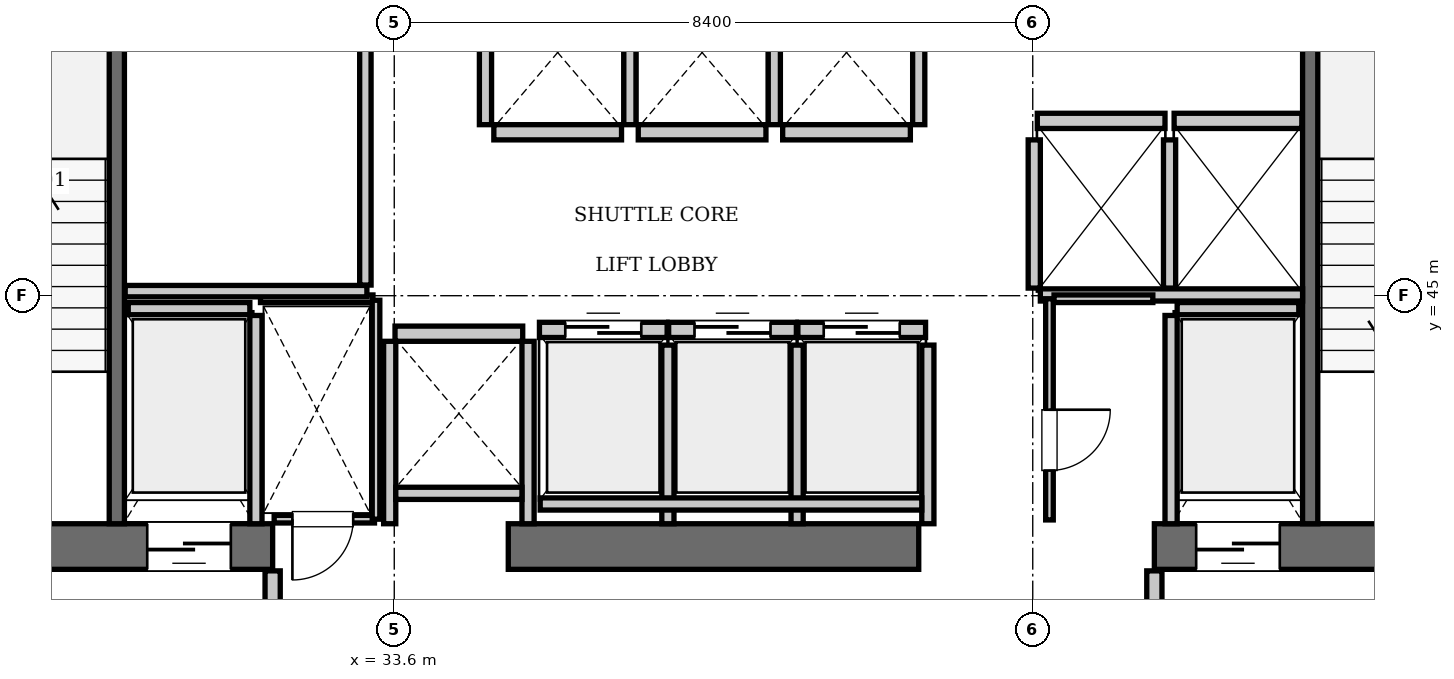
"""IFC4 building model, lengths in metres.
Left out: names, types, materials, properties, quantities, classifications, styles, units other than length and angle.
Written with IfcOpenShell. Run it as: python <this file> out.ifc"""

import sys

from ifc_helpers import new_model, si_unit, direction, frame, frame_2d, origin, place, context, subcontext, project, spatial, rectangle, extrude, element, fill, save


model = new_model("IFC4")
c1 = context("Model", 3, precision=1e-05, world=origin(), true_north=direction((0.0, 1.0)))
c2 = subcontext(c1, "Body", "Model", "MODEL_VIEW")
j1 = project(units=[si_unit("LENGTHUNIT", "METRE"), si_unit("PLANEANGLEUNIT", "RADIAN")], contexts=[c1])
p1 = place(None, origin())
s1 = spatial("IfcSite", under=j1, at=p1, CompositionType="ELEMENT")
p2 = place(p1, origin())
s2 = spatial("IfcBuilding", under=s1, at=p2, CompositionType="ELEMENT")
p3 = place(p2, frame((0.0, 0.0, 239.4)))
s3 = spatial("IfcBuildingStorey", under=s2, at=p3, CompositionType="ELEMENT", Elevation=239.4)
p4 = place(p3, frame((25.2, 41.7, 0.0), z_axis=(0.0, 0.0, 1.0), x_axis=(1.0, 0.0, 0.0)))
e1 = element("IfcWall", 1, at=p4, inside=s3, PredefinedType="SHEAR", context=c2, shape_type="SweptSolid", body=[
    extrude(rectangle(XDim=6.8, YDim=0.6, at=frame_2d((3.4, 0.0))), origin(), (0.0, 0.0, 1.0), 3.85),
])
p5 = place(p4, frame((1.65, 0.0, 0.0)))
e2 = element("IfcOpeningElement", 2, at=p5, cuts=e1, PredefinedType="OPENING", context=c2, shape_type="SweptSolid", body=[
    extrude(rectangle(XDim=1.15, YDim=2.15, at=frame_2d((0.575, 1.075))), frame((0.0, 0.31, 0.0), z_axis=(0.0, -1.0, 0.0), x_axis=(1.0, 0.0, 0.0)), (0.0, 0.0, 1.0), 0.62),
])
p6 = place(p4, frame((5.15, 0.0, 0.0)))
e3 = element("IfcOpeningElement", 3, at=p6, cuts=e1, PredefinedType="OPENING", context=c2, shape_type="SweptSolid", body=[
    extrude(rectangle(XDim=1.1, YDim=2.2, at=frame_2d((0.55, 1.1))), frame((0.0, 0.31, 0.0), z_axis=(0.0, -1.0, 0.0), x_axis=(1.0, 0.0, 0.0)), (0.0, 0.0, 1.0), 0.62),
])
p7 = place(p3, frame((35.1, 41.7, 0.0), z_axis=(0.0, 0.0, 1.0), x_axis=(1.0, 0.0, 0.0)))
e4 = element("IfcWall", 4, at=p7, inside=s3, PredefinedType="SHEAR", context=c2, shape_type="SweptSolid", body=[
    extrude(rectangle(XDim=5.4, YDim=0.6, at=frame_2d((2.7, 0.0))), origin(), (0.0, 0.0, 1.0), 3.85),
])
p8 = place(p3, frame((43.6, 41.7, 0.0), z_axis=(0.0, 0.0, 1.0), x_axis=(1.0, 0.0, 0.0)))
e5 = element("IfcWall", 5, at=p8, inside=s3, PredefinedType="SHEAR", context=c2, shape_type="SweptSolid", body=[
    extrude(rectangle(XDim=6.8, YDim=0.6, at=frame_2d((3.4, 0.0))), origin(), (0.0, 0.0, 1.0), 3.85),
])
p9 = place(p8, frame((3.9, 0.0, 0.0)))
e6 = element("IfcOpeningElement", 6, at=p9, cuts=e5, PredefinedType="OPENING", context=c2, shape_type="SweptSolid", body=[
    extrude(rectangle(XDim=1.15, YDim=2.15, at=frame_2d((0.575, 1.075))), frame((0.0, 0.31, 0.0), z_axis=(0.0, -1.0, 0.0), x_axis=(1.0, 0.0, 0.0)), (0.0, 0.0, 1.0), 0.62),
])
p10 = place(p8, frame((0.55, 0.0, 0.0)))
e7 = element("IfcOpeningElement", 7, at=p10, cuts=e5, PredefinedType="OPENING", context=c2, shape_type="SweptSolid", body=[
    extrude(rectangle(XDim=1.1, YDim=2.2, at=frame_2d((0.55, 1.1))), frame((0.0, 0.31, 0.0), z_axis=(0.0, -1.0, 0.0), x_axis=(1.0, 0.0, 0.0)), (0.0, 0.0, 1.0), 0.62),
])
for number, where, z_axis, x_axis in (
    (8, (29.95, 42.0, 0.0), (0.0, 0.0, 1.0), (0.0, 1.0, 0.0)),
    (9, (45.65, 42.0, 0.0), (0.0, 0.0, 1.0), (0.0, 1.0, 0.0)),
):
    element("IfcWall", number, at=place(p3, frame(where, z_axis=z_axis, x_axis=x_axis)), inside=s3, PredefinedType="SOLIDWALL", context=c2, shape_type="SweptSolid", body=[
        extrude(rectangle(XDim=9.15, YDim=0.2, at=frame_2d((4.575, 0.0))), origin(), (0.0, 0.0, 1.0), 3.61),
    ])
for number, where, z_axis, x_axis in (
    (10, (42.06, 47.3, 0.0), (0.0, 0.0, 1.0), (1.0, 0.0, 0.0)),
    (11, (43.86, 47.3, 0.0), (0.0, 0.0, 1.0), (1.0, 0.0, 0.0)),
):
    element("IfcWall", number, at=place(p3, frame(where, z_axis=z_axis, x_axis=x_axis)), inside=s3, PredefinedType="SOLIDWALL", context=c2, shape_type="SweptSolid", body=[
        extrude(rectangle(XDim=1.68, YDim=0.2, at=frame_2d((0.84, 0.0))), origin(), (0.0, 0.0, 1.0), 3.61),
    ])
p11 = place(p3, frame((35.51, 44.55, 0.0), z_axis=(0.0, 0.0, 1.0), x_axis=(1.0, 0.0, 0.0)))
e12 = element("IfcWall", 12, at=p11, inside=s3, PredefinedType="SOLIDWALL", context=c2, shape_type="SweptSolid", body=[
    extrude(rectangle(XDim=1.68, YDim=0.2, at=frame_2d((0.84, 0.0))), origin(), (0.0, 0.0, 1.0), 3.61),
])
p12 = place(p11, frame((0.34, 0.0, 0.0)))
e13 = element("IfcOpeningElement", 13, at=p12, cuts=e12, PredefinedType="OPENING", context=c2, shape_type="SweptSolid", body=[
    extrude(rectangle(XDim=1.0, YDim=2.15, at=frame_2d((0.5, 1.075))), frame((0.0, 0.11, 0.0), z_axis=(0.0, -1.0, 0.0), x_axis=(1.0, 0.0, 0.0)), (0.0, 0.0, 1.0), 0.22),
])
p13 = place(p3, frame((37.21, 44.55, 0.0), z_axis=(0.0, 0.0, 1.0), x_axis=(1.0, 0.0, 0.0)))
e14 = element("IfcWall", 14, at=p13, inside=s3, PredefinedType="SOLIDWALL", context=c2, shape_type="SweptSolid", body=[
    extrude(rectangle(XDim=1.68, YDim=0.2, at=frame_2d((0.84, 0.0))), origin(), (0.0, 0.0, 1.0), 3.61),
])
p14 = place(p13, frame((0.34, 0.0, 0.0)))
e15 = element("IfcOpeningElement", 15, at=p14, cuts=e14, PredefinedType="OPENING", context=c2, shape_type="SweptSolid", body=[
    extrude(rectangle(XDim=1.0, YDim=2.15, at=frame_2d((0.5, 1.075))), frame((0.0, 0.11, 0.0), z_axis=(0.0, -1.0, 0.0), x_axis=(1.0, 0.0, 0.0)), (0.0, 0.0, 1.0), 0.22),
])
p15 = place(p3, frame((38.91, 44.55, 0.0), z_axis=(0.0, 0.0, 1.0), x_axis=(1.0, 0.0, 0.0)))
e16 = element("IfcWall", 16, at=p15, inside=s3, PredefinedType="SOLIDWALL", context=c2, shape_type="SweptSolid", body=[
    extrude(rectangle(XDim=1.68, YDim=0.2, at=frame_2d((0.84, 0.0))), origin(), (0.0, 0.0, 1.0), 3.61),
])
p16 = place(p15, frame((0.34, 0.0, 0.0)))
e17 = element("IfcOpeningElement", 17, at=p16, cuts=e16, PredefinedType="OPENING", context=c2, shape_type="SweptSolid", body=[
    extrude(rectangle(XDim=1.0, YDim=2.15, at=frame_2d((0.5, 1.075))), frame((0.0, 0.11, 0.0), z_axis=(0.0, -1.0, 0.0), x_axis=(1.0, 0.0, 0.0)), (0.0, 0.0, 1.0), 0.22),
])
p17 = place(p3, frame((34.91, 47.15, 0.0), z_axis=(0.0, 0.0, 1.0), x_axis=(1.0, 0.0, 0.0)))
e18 = element("IfcWall", 18, at=p17, inside=s3, PredefinedType="SOLIDWALL", context=c2, shape_type="SweptSolid", body=[
    extrude(rectangle(XDim=1.68, YDim=0.2, at=frame_2d((0.84, 0.0))), origin(), (0.0, 0.0, 1.0), 3.61),
])
for number, where, z_axis, x_axis in (
    (19, (36.81, 47.15, 0.0), (0.0, 0.0, 1.0), (1.0, 0.0, 0.0)),
    (20, (38.71, 47.15, 0.0), (0.0, 0.0, 1.0), (1.0, 0.0, 0.0)),
    (21, (33.61, 44.5, 0.0), (0.0, 0.0, 1.0), (1.0, 0.0, 0.0)),
):
    element("IfcWall", number, at=place(p3, frame(where, z_axis=z_axis, x_axis=x_axis)), inside=s3, PredefinedType="SOLIDWALL", context=c2, shape_type="SweptSolid", body=[
        extrude(rectangle(XDim=1.68, YDim=0.2, at=frame_2d((0.84, 0.0))), origin(), (0.0, 0.0, 1.0), 3.61),
    ])
p18 = place(p3, frame((30.1, 44.83, 0.0), z_axis=(0.0, 0.0, 1.0), x_axis=(1.0, 0.0, 0.0)))
e22 = element("IfcWall", 22, at=p18, inside=s3, PredefinedType="SOLIDWALL", context=c2, shape_type="SweptSolid", body=[
    extrude(rectangle(XDim=1.6, YDim=0.16, at=frame_2d((0.8, 0.0))), origin(), (0.0, 0.0, 1.0), 3.61),
])
p19 = place(p3, frame((31.78, 42.0, 0.0), z_axis=(0.0, 0.0, 1.0), x_axis=(0.0, 1.0, 0.0)))
e23 = element("IfcWall", 23, at=p19, inside=s3, PredefinedType="SOLIDWALL", context=c2, shape_type="SweptSolid", body=[
    extrude(rectangle(XDim=2.74, YDim=0.16, at=frame_2d((1.37, 0.0))), origin(), (0.0, 0.0, 1.0), 3.61),
])
p20 = place(p3, frame((43.9, 44.83, 0.0), z_axis=(0.0, 0.0, 1.0), x_axis=(1.0, 0.0, 0.0)))
e24 = element("IfcWall", 24, at=p20, inside=s3, PredefinedType="SOLIDWALL", context=c2, shape_type="SweptSolid", body=[
    extrude(rectangle(XDim=1.6, YDim=0.16, at=frame_2d((0.8, 0.0))), origin(), (0.0, 0.0, 1.0), 3.61),
])
p21 = place(p3, frame((43.82, 42.0, 0.0), z_axis=(0.0, 0.0, 1.0), x_axis=(0.0, 1.0, 0.0)))
e25 = element("IfcWall", 25, at=p21, inside=s3, PredefinedType="SOLIDWALL", context=c2, shape_type="SweptSolid", body=[
    extrude(rectangle(XDim=2.74, YDim=0.16, at=frame_2d((1.37, 0.0))), origin(), (0.0, 0.0, 1.0), 3.61),
])
for number, where, z_axis, x_axis in (
    (26, (42.02, 45.1, 0.0), (0.0, 0.0, 1.0), (0.0, 1.0, 0.0)),
    (27, (43.8, 45.1, 0.0), (0.0, 0.0, 1.0), (0.0, 1.0, 0.0)),
):
    element("IfcWall", number, at=place(p3, frame(where, z_axis=z_axis, x_axis=x_axis)), inside=s3, PredefinedType="SOLIDWALL", context=c2, shape_type="SweptSolid", body=[
        extrude(rectangle(XDim=1.95, YDim=0.16, at=frame_2d((0.975, 0.0))), origin(), (0.0, 0.0, 1.0), 3.61),
    ])
p22 = place(p3, frame((42.1, 45.01, 0.0), z_axis=(0.0, 0.0, 1.0), x_axis=(1.0, 0.0, 0.0)))
e28 = element("IfcWall", 28, at=p22, inside=s3, PredefinedType="SOLIDWALL", context=c2, shape_type="SweptSolid", body=[
    extrude(rectangle(XDim=3.45, YDim=0.16, at=frame_2d((1.725, 0.0))), origin(), (0.0, 0.0, 1.0), 3.61),
])
for number, where, z_axis, x_axis in (
    (29, (37.2, 42.0, 0.0), (0.0, 0.0, 1.0), (0.0, 1.0, 0.0)),
    (30, (38.9, 42.0, 0.0), (0.0, 0.0, 1.0), (0.0, 1.0, 0.0)),
    (31, (40.62, 42.0, 0.0), (0.0, 0.0, 1.0), (0.0, 1.0, 0.0)),
):
    element("IfcWall", number, at=place(p3, frame(where, z_axis=z_axis, x_axis=x_axis)), inside=s3, PredefinedType="SOLIDWALL", context=c2, shape_type="SweptSolid", body=[
        extrude(rectangle(XDim=2.35, YDim=0.16, at=frame_2d((1.175, 0.0))), origin(), (0.0, 0.0, 1.0), 3.61),
    ])
p23 = place(p3, frame((35.52, 42.26, 0.0), z_axis=(0.0, 0.0, 1.0), x_axis=(1.0, 0.0, 0.0)))
e32 = element("IfcWall", 32, at=p23, inside=s3, PredefinedType="SOLIDWALL", context=c2, shape_type="SweptSolid", body=[
    extrude(rectangle(XDim=5.02, YDim=0.16, at=frame_2d((2.51, 0.0))), origin(), (0.0, 0.0, 1.0), 3.61),
])
for number, where, z_axis, x_axis in (
    (33, (34.8, 47.25, 0.0), (0.0, 0.0, 1.0), (0.0, 1.0, 0.0)),
    (34, (36.7, 47.25, 0.0), (0.0, 0.0, 1.0), (0.0, 1.0, 0.0)),
    (35, (38.6, 47.25, 0.0), (0.0, 0.0, 1.0), (0.0, 1.0, 0.0)),
    (36, (40.5, 47.25, 0.0), (0.0, 0.0, 1.0), (0.0, 1.0, 0.0)),
):
    element("IfcWall", number, at=place(p3, frame(where, z_axis=z_axis, x_axis=x_axis)), inside=s3, PredefinedType="SOLIDWALL", context=c2, shape_type="SweptSolid", body=[
        extrude(rectangle(XDim=2.19, YDim=0.16, at=frame_2d((1.095, 0.0))), origin(), (0.0, 0.0, 1.0), 3.61),
    ])
for number, where, z_axis, x_axis in (
    (37, (33.54, 42.0, 0.0), (0.0, 0.0, 1.0), (0.0, 1.0, 0.0)),
    (38, (35.36, 42.0, 0.0), (0.0, 0.0, 1.0), (0.0, 1.0, 0.0)),
):
    element("IfcWall", number, at=place(p3, frame(where, z_axis=z_axis, x_axis=x_axis)), inside=s3, PredefinedType="SOLIDWALL", context=c2, shape_type="SweptSolid", body=[
        extrude(rectangle(XDim=2.4, YDim=0.16, at=frame_2d((1.2, 0.0))), origin(), (0.0, 0.0, 1.0), 3.61),
    ])
p24 = place(p3, frame((33.62, 42.4, 0.0), z_axis=(0.0, 0.0, 1.0), x_axis=(1.0, 0.0, 0.0)))
e39 = element("IfcWall", 39, at=p24, inside=s3, PredefinedType="SOLIDWALL", context=c2, shape_type="SweptSolid", body=[
    extrude(rectangle(XDim=1.66, YDim=0.16, at=frame_2d((0.83, 0.0))), origin(), (0.0, 0.0, 1.0), 3.61),
])
for number, where, z_axis, x_axis in (
    (40, (32.0, 38.31, 0.0), (0.0, 0.0, 1.0), (0.0, 1.0, 0.0)),
    (41, (43.6, 38.31, 0.0), (0.0, 0.0, 1.0), (0.0, 1.0, 0.0)),
):
    element("IfcWall", number, at=place(p3, frame(where, z_axis=z_axis, x_axis=x_axis)), inside=s3, PredefinedType="PARTITIONING", context=c2, shape_type="SweptSolid", body=[
        extrude(rectangle(XDim=3.07, YDim=0.2, at=frame_2d((1.535, 0.0))), origin(), (0.0, 0.0, 1.0), 3.61),
    ])
p25 = place(p3, frame((32.02, 42.06, 0.0), z_axis=(0.0, 0.0, 1.0), x_axis=(1.0, 0.0, 0.0)))
e42 = element("IfcWall", 42, at=p25, inside=s3, PredefinedType="PARTITIONING", context=c2, shape_type="SweptSolid", body=[
    extrude(rectangle(XDim=1.32, YDim=0.1, at=frame_2d((0.66, 0.0))), origin(), (0.0, 0.0, 1.0), 3.61),
])
p26 = place(p25, frame((0.24, 0.0, 0.0)))
e43 = element("IfcOpeningElement", 43, at=p26, cuts=e42, PredefinedType="OPENING", context=c2, shape_type="SweptSolid", body=[
    extrude(rectangle(XDim=0.8, YDim=2.05, at=frame_2d((0.4, 1.025))), frame((0.0, 0.06, 0.0), z_axis=(0.0, -1.0, 0.0), x_axis=(1.0, 0.0, 0.0)), (0.0, 0.0, 1.0), 0.12),
])
p27 = place(p3, frame((31.84, 44.96, 0.0), z_axis=(0.0, 0.0, 1.0), x_axis=(1.0, 0.0, 0.0)))
e44 = element("IfcWall", 44, at=p27, inside=s3, PredefinedType="PARTITIONING", context=c2, shape_type="SweptSolid", body=[
    extrude(rectangle(XDim=1.48, YDim=0.1, at=frame_2d((0.74, 0.0))), origin(), (0.0, 0.0, 1.0), 3.61),
])
p28 = place(p3, frame((33.36, 42.06, 0.0), z_axis=(0.0, 0.0, 1.0), x_axis=(0.0, 1.0, 0.0)))
e45 = element("IfcWall", 45, at=p28, inside=s3, PredefinedType="PARTITIONING", context=c2, shape_type="SweptSolid", body=[
    extrude(rectangle(XDim=2.88, YDim=0.1, at=frame_2d((1.44, 0.0))), origin(), (0.0, 0.0, 1.0), 3.61),
])
p29 = place(p3, frame((42.22, 42.05, 0.0), z_axis=(0.0, 0.0, 1.0), x_axis=(0.0, 1.0, 0.0)))
e46 = element("IfcWall", 46, at=p29, inside=s3, PredefinedType="PARTITIONING", context=c2, shape_type="SweptSolid", body=[
    extrude(rectangle(XDim=2.91, YDim=0.1, at=frame_2d((1.455, 0.0))), origin(), (0.0, 0.0, 1.0), 3.61),
])
p30 = place(p29, frame((0.65, 0.0, 0.0)))
e47 = element("IfcOpeningElement", 47, at=p30, cuts=e46, PredefinedType="OPENING", context=c2, shape_type="SweptSolid", body=[
    extrude(rectangle(XDim=0.8, YDim=2.05, at=frame_2d((0.4, 1.025))), frame((0.0, 0.06, 0.0), z_axis=(0.0, -1.0, 0.0), x_axis=(1.0, 0.0, 0.0)), (0.0, 0.0, 1.0), 0.12),
])
p31 = place(p3, frame((42.28, 44.96, 0.0), z_axis=(0.0, 0.0, 1.0), x_axis=(1.0, 0.0, 0.0)))
e48 = element("IfcWall", 48, at=p31, inside=s3, PredefinedType="PARTITIONING", context=c2, shape_type="SweptSolid", body=[
    extrude(rectangle(XDim=1.3, YDim=0.1, at=frame_2d((0.65, 0.0))), origin(), (0.0, 0.0, 1.0), 3.61),
])
p32 = place(p3, frame((30.06, 45.06, 0.0), z_axis=(0.0, 0.0, 1.0), x_axis=(1.0, 0.0, 0.0)))
e49 = element("IfcWall", 49, at=p32, inside=s3, PredefinedType="PARTITIONING", context=c2, shape_type="SweptSolid", body=[
    extrude(rectangle(XDim=3.18, YDim=0.15, at=frame_2d((1.59, 0.0))), origin(), (0.0, 0.0, 1.0), 3.61),
])
p33 = place(p3, frame((33.22, 45.14, 0.0), z_axis=(0.0, 0.0, 1.0), x_axis=(0.0, 1.0, 0.0)))
e50 = element("IfcWall", 50, at=p33, inside=s3, PredefinedType="PARTITIONING", context=c2, shape_type="SweptSolid", body=[
    extrude(rectangle(XDim=4.16, YDim=0.15, at=frame_2d((2.08, 0.0))), origin(), (0.0, 0.0, 1.0), 3.61),
])
p34 = place(p12, origin())
e51 = element("IfcDoor", 51, at=p34, inside=s3, OperationType="SLIDING_TO_LEFT", PredefinedType="DOOR", context=c2, shape_type="SweptSolid", body=[
    extrude(rectangle(XDim=1.0, YDim=2.15, at=frame_2d((0.5, 1.075))), frame((0.0, 0.025, 0.0), z_axis=(0.0, -1.0, 0.0), x_axis=(1.0, 0.0, 0.0)), (0.0, 0.0, 1.0), 0.05),
])
fill(e13, e51)
p35 = place(p14, origin())
e52 = element("IfcDoor", 52, at=p35, inside=s3, OperationType="SLIDING_TO_LEFT", PredefinedType="DOOR", context=c2, shape_type="SweptSolid", body=[
    extrude(rectangle(XDim=1.0, YDim=2.15, at=frame_2d((0.5, 1.075))), frame((0.0, 0.025, 0.0), z_axis=(0.0, -1.0, 0.0), x_axis=(1.0, 0.0, 0.0)), (0.0, 0.0, 1.0), 0.05),
])
fill(e15, e52)
p36 = place(p16, origin())
e53 = element("IfcDoor", 53, at=p36, inside=s3, OperationType="SLIDING_TO_LEFT", PredefinedType="DOOR", context=c2, shape_type="SweptSolid", body=[
    extrude(rectangle(XDim=1.0, YDim=2.15, at=frame_2d((0.5, 1.075))), frame((0.0, 0.025, 0.0), z_axis=(0.0, -1.0, 0.0), x_axis=(1.0, 0.0, 0.0)), (0.0, 0.0, 1.0), 0.05),
])
fill(e17, e53)
p37 = place(p6, frame((1.1, 0.0, 0.0), z_axis=(0.0, 0.0, 1.0), x_axis=(-1.0, 0.0, 0.0)))
e54 = element("IfcDoor", 54, at=p37, inside=s3, OperationType="SLIDING_TO_LEFT", PredefinedType="DOOR", context=c2, shape_type="SweptSolid", body=[
    extrude(rectangle(XDim=1.1, YDim=2.2, at=frame_2d((0.55, 1.1))), frame((0.0, 0.025, 0.0), z_axis=(0.0, -1.0, 0.0), x_axis=(1.0, 0.0, 0.0)), (0.0, 0.0, 1.0), 0.05),
])
fill(e3, e54)
p38 = place(p10, frame((1.1, 0.0, 0.0), z_axis=(0.0, 0.0, 1.0), x_axis=(-1.0, 0.0, 0.0)))
e55 = element("IfcDoor", 55, at=p38, inside=s3, OperationType="SLIDING_TO_LEFT", PredefinedType="DOOR", context=c2, shape_type="SweptSolid", body=[
    extrude(rectangle(XDim=1.1, YDim=2.2, at=frame_2d((0.55, 1.1))), frame((0.0, 0.025, 0.0), z_axis=(0.0, -1.0, 0.0), x_axis=(1.0, 0.0, 0.0)), (0.0, 0.0, 1.0), 0.05),
])
fill(e7, e55)
p39 = place(p26, frame((0.8, 0.0, 0.0), z_axis=(0.0, 0.0, 1.0), x_axis=(-1.0, 0.0, 0.0)))
e56 = element("IfcDoor", 56, at=p39, inside=s3, OperationType="SINGLE_SWING_RIGHT", PredefinedType="DOOR", context=c2, shape_type="SweptSolid", body=[
    extrude(rectangle(XDim=0.8, YDim=2.05, at=frame_2d((0.4, 1.025))), frame((0.0, 0.025, 0.0), z_axis=(0.0, -1.0, 0.0), x_axis=(1.0, 0.0, 0.0)), (0.0, 0.0, 1.0), 0.05),
])
fill(e43, e56)
p40 = place(p30, frame((0.8, 0.0, 0.0), z_axis=(0.0, 0.0, 1.0), x_axis=(-1.0, 0.0, 0.0)))
e57 = element("IfcDoor", 57, at=p40, inside=s3, OperationType="SINGLE_SWING_LEFT", PredefinedType="DOOR", context=c2, shape_type="SweptSolid", body=[
    extrude(rectangle(XDim=0.8, YDim=2.05, at=frame_2d((0.4, 1.025))), frame((0.0, 0.025, 0.0), z_axis=(0.0, -1.0, 0.0), x_axis=(1.0, 0.0, 0.0)), (0.0, 0.0, 1.0), 0.05),
])
fill(e47, e57)
save(model, sys.argv[1])
